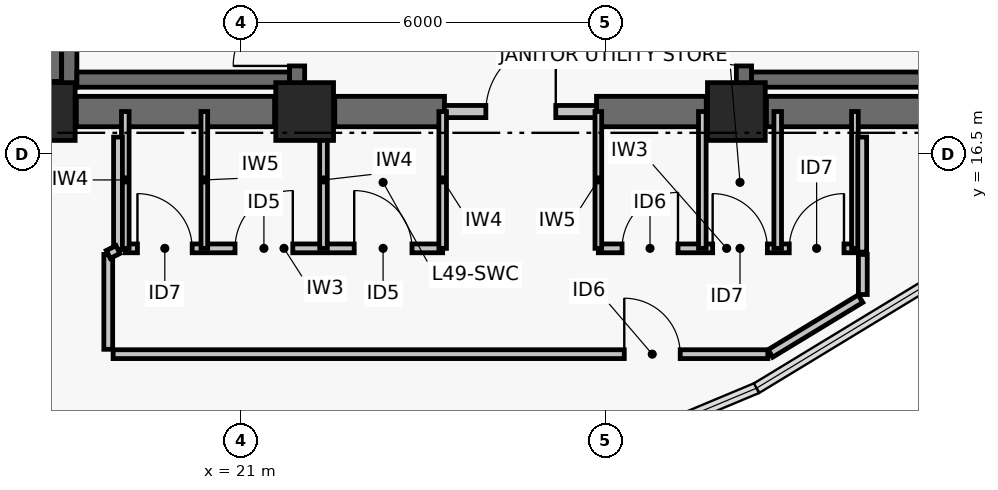
"""IFC4 building model, lengths in metres.
Left out: names, types, materials, properties, quantities, classifications, styles, units other than length and angle.
Written with IfcOpenShell. Run it as: python <this file> out.ifc"""

import sys

from ifc_helpers import new_model, si_unit, direction, frame, frame_2d, origin, origin_2d, place, context, subcontext, project, spatial, rectangle, extrude, element, fill, save


model = new_model("IFC4")
c1 = context("Model", 3, precision=1e-05, world=origin(), true_north=direction((0.0, 1.0)))
c2 = subcontext(c1, "Body", "Model", "MODEL_VIEW")
j1 = project(units=[si_unit("LENGTHUNIT", "METRE"), si_unit("PLANEANGLEUNIT", "RADIAN")], contexts=[c1])
p1 = place(None, origin())
s1 = spatial("IfcSite", under=j1, at=p1, CompositionType="ELEMENT")
p2 = place(p1, origin())
s2 = spatial("IfcBuilding", under=s1, at=p2, CompositionType="ELEMENT")
p3 = place(p2, frame((0.0, 0.0, 195.24)))
s3 = spatial("IfcBuildingStorey", under=s2, at=p3, CompositionType="ELEMENT", Elevation=195.24)
for number, where, z_axis, x_axis in (
    (1, (17.8, 17.2, 0.0), (0.0, 0.0, 1.0), (1.0, 0.0, 0.0)),
    (2, (22.05, 17.2, 0.0), (0.0, 0.0, 1.0), (1.0, 0.0, 0.0)),
    (3, (29.15, 17.2, 0.0), (0.0, 0.0, 1.0), (1.0, 0.0, 0.0)),
):
    element("IfcColumn", number, at=place(p3, frame(where, z_axis=z_axis, x_axis=x_axis)), inside=s3, PredefinedType="COLUMN", context=c2, shape_type="SweptSolid", body=[
        extrude(rectangle(XDim=0.95, YDim=0.95, at=origin_2d()), origin(), (0.0, 0.0, 1.0), 3.72),
    ])
p4 = place(p3, frame((18.295, 17.2, 0.0), z_axis=(0.0, 0.0, 1.0), x_axis=(1.0, 0.0, 0.0)))
e4 = element("IfcWall", 4, at=p4, inside=s3, PredefinedType="SHEAR", context=c2, shape_type="SweptSolid", body=[
    extrude(rectangle(XDim=3.26, YDim=0.5, at=frame_2d((1.63, 0.0))), origin(), (0.0, 0.0, 1.0), 3.5),
])
p5 = place(p3, frame((22.545, 17.2, 0.0), z_axis=(0.0, 0.0, 1.0), x_axis=(1.0, 0.0, 0.0)))
e5 = element("IfcWall", 5, at=p5, inside=s3, PredefinedType="SHEAR", context=c2, shape_type="SweptSolid", body=[
    extrude(rectangle(XDim=1.805, YDim=0.5, at=frame_2d((0.903, 0.0))), origin(), (0.0, 0.0, 1.0), 3.5),
])
p6 = place(p3, frame((26.85, 17.2, 0.0), z_axis=(0.0, 0.0, 1.0), x_axis=(1.0, 0.0, 0.0)))
e6 = element("IfcWall", 6, at=p6, inside=s3, PredefinedType="SHEAR", context=c2, shape_type="SweptSolid", body=[
    extrude(rectangle(XDim=1.805, YDim=0.5, at=frame_2d((0.902, 0.0))), origin(), (0.0, 0.0, 1.0), 3.5),
])
p7 = place(p3, frame((29.645, 17.2, 0.0), z_axis=(0.0, 0.0, 1.0), x_axis=(1.0, 0.0, 0.0)))
e7 = element("IfcWall", 7, at=p7, inside=s3, PredefinedType="SHEAR", context=c2, shape_type="SweptSolid", body=[
    extrude(rectangle(XDim=3.26, YDim=0.5, at=frame_2d((1.63, 0.0))), origin(), (0.0, 0.0, 1.0), 3.5),
])
p8 = place(p3, frame((17.8, 17.695, 0.0), z_axis=(0.0, 0.0, 1.0), x_axis=(0.0, 1.0, 0.0)))
e8 = element("IfcWall", 8, at=p8, inside=s3, PredefinedType="SHEAR", context=c2, shape_type="SweptSolid", body=[
    extrude(rectangle(XDim=8.61, YDim=0.5, at=frame_2d((4.305, 0.0))), origin(), (0.0, 0.0, 1.0), 3.5),
])
p9 = place(p3, frame((18.179, 17.6, 0.0), z_axis=(0.0, 0.0, 1.0), x_axis=(0.0, 1.0, 0.0)))
e9 = element("IfcWall", 9, at=p9, inside=s3, PredefinedType="SHEAR", context=c2, shape_type="SweptSolid", body=[
    extrude(rectangle(XDim=8.8, YDim=0.25, at=frame_2d((4.4, 0.0))), origin(), (0.0, 0.0, 1.0), 3.5),
])
p10 = place(p3, frame((21.925, 17.6, 0.0), z_axis=(0.0, 0.0, 1.0), x_axis=(0.0, 1.0, 0.0)))
e10 = element("IfcWall", 10, at=p10, inside=s3, PredefinedType="SHEAR", context=c2, shape_type="SweptSolid", body=[
    extrude(rectangle(XDim=8.8, YDim=0.25, at=frame_2d((4.4, 0.0))), origin(), (0.0, 0.0, 1.0), 3.5),
])
p11 = place(p10, frame((0.35, 0.0, 0.0)))
e11 = element("IfcOpeningElement", 11, at=p11, cuts=e10, PredefinedType="OPENING", context=c2, shape_type="SweptSolid", body=[
    extrude(rectangle(XDim=1.05, YDim=2.08, at=frame_2d((0.525, 1.04))), frame((0.0, 0.135, 0.0), z_axis=(0.0, -1.0, 0.0), x_axis=(1.0, 0.0, 0.0)), (0.0, 0.0, 1.0), 0.27),
])
p12 = place(p3, frame((18.304, 17.725, 0.0), z_axis=(0.0, 0.0, 1.0), x_axis=(1.0, 0.0, 0.0)))
e12 = element("IfcWall", 12, at=p12, inside=s3, PredefinedType="SHEAR", context=c2, shape_type="SweptSolid", body=[
    extrude(rectangle(XDim=3.496, YDim=0.25, at=frame_2d((1.748, 0.0))), origin(), (0.0, 0.0, 1.0), 3.5),
])
p13 = place(p3, frame((29.275, 17.6, 0.0), z_axis=(0.0, 0.0, 1.0), x_axis=(0.0, 1.0, 0.0)))
e13 = element("IfcWall", 13, at=p13, inside=s3, PredefinedType="SHEAR", context=c2, shape_type="SweptSolid", body=[
    extrude(rectangle(XDim=8.8, YDim=0.25, at=frame_2d((4.4, 0.0))), origin(), (0.0, 0.0, 1.0), 3.5),
])
p14 = place(p13, frame((0.35, 0.0, 0.0)))
e14 = element("IfcOpeningElement", 14, at=p14, cuts=e13, PredefinedType="OPENING", context=c2, shape_type="SweptSolid", body=[
    extrude(rectangle(XDim=1.05, YDim=2.08, at=frame_2d((0.525, 1.04))), frame((0.0, 0.135, 0.0), z_axis=(0.0, -1.0, 0.0), x_axis=(1.0, 0.0, 0.0)), (0.0, 0.0, 1.0), 0.27),
])
p15 = place(p3, frame((29.4, 17.725, 0.0), z_axis=(0.0, 0.0, 1.0), x_axis=(1.0, 0.0, 0.0)))
e15 = element("IfcWall", 15, at=p15, inside=s3, PredefinedType="SHEAR", context=c2, shape_type="SweptSolid", body=[
    extrude(rectangle(XDim=3.496, YDim=0.25, at=frame_2d((1.748, 0.0))), origin(), (0.0, 0.0, 1.0), 3.5),
])
p16 = place(p3, frame((24.35, 17.2, 0.0), z_axis=(0.0, 0.0, 1.0), x_axis=(1.0, 0.0, 0.0)))
e16 = element("IfcWall", 16, at=p16, inside=s3, PredefinedType="PARTITIONING", context=c2, shape_type="SweptSolid", body=[
    extrude(rectangle(XDim=2.5, YDim=0.2, at=frame_2d((1.25, 0.0))), origin(), (0.0, 0.0, 1.0), 2.63),
])
p17 = place(p16, frame((0.68, 0.0, 0.0)))
e17 = element("IfcOpeningElement", 17, at=p17, cuts=e16, PredefinedType="OPENING", context=c2, shape_type="SweptSolid", body=[
    extrude(rectangle(XDim=1.15, YDim=2.08, at=frame_2d((0.575, 1.04))), frame((0.0, 0.11, 0.0), z_axis=(0.0, -1.0, 0.0), x_axis=(1.0, 0.0, 0.0)), (0.0, 0.0, 1.0), 0.22),
])
p18 = place(p3, frame((19.1, 14.95, 0.0), z_axis=(0.0, 0.0, 1.0), x_axis=(1.0, 0.0, 0.0)))
e18 = element("IfcWall", 18, at=p18, inside=s3, PredefinedType="PARTITIONING", context=c2, shape_type="SweptSolid", body=[
    extrude(rectangle(XDim=5.22, YDim=0.145, at=frame_2d((2.61, 0.0))), origin(), (0.0, 0.0, 1.0), 2.73),
])
p19 = place(p18, frame((0.2, 0.0, 0.0)))
e19 = element("IfcOpeningElement", 19, at=p19, cuts=e18, PredefinedType="OPENING", context=c2, shape_type="SweptSolid", body=[
    extrude(rectangle(XDim=0.9, YDim=2.02, at=frame_2d((0.45, 1.01))), frame((0.0, 0.083, 0.0), z_axis=(0.0, -1.0, 0.0), x_axis=(1.0, 0.0, 0.0)), (0.0, 0.0, 1.0), 0.165),
])
p20 = place(p18, frame((1.805, 0.0, 0.0)))
e20 = element("IfcOpeningElement", 20, at=p20, cuts=e18, PredefinedType="OPENING", context=c2, shape_type="SweptSolid", body=[
    extrude(rectangle(XDim=0.95, YDim=2.06, at=frame_2d((0.475, 1.03))), frame((0.0, 0.083, 0.0), z_axis=(0.0, -1.0, 0.0), x_axis=(1.0, 0.0, 0.0)), (0.0, 0.0, 1.0), 0.165),
])
p21 = place(p18, frame((3.765, 0.0, 0.0)))
e21 = element("IfcOpeningElement", 21, at=p21, cuts=e18, PredefinedType="OPENING", context=c2, shape_type="SweptSolid", body=[
    extrude(rectangle(XDim=0.95, YDim=2.06, at=frame_2d((0.475, 1.03))), frame((0.0, 0.083, 0.0), z_axis=(0.0, -1.0, 0.0), x_axis=(1.0, 0.0, 0.0)), (0.0, 0.0, 1.0), 0.165),
])
p22 = place(p3, frame((26.88, 14.95, 0.0), z_axis=(0.0, 0.0, 1.0), x_axis=(1.0, 0.0, 0.0)))
e22 = element("IfcWall", 22, at=p22, inside=s3, PredefinedType="PARTITIONING", context=c2, shape_type="SweptSolid", body=[
    extrude(rectangle(XDim=4.22, YDim=0.145, at=frame_2d((2.11, 0.0))), origin(), (0.0, 0.0, 1.0), 2.93),
])
p23 = place(p22, frame((0.39, 0.0, 0.0)))
e23 = element("IfcOpeningElement", 23, at=p23, cuts=e22, PredefinedType="OPENING", context=c2, shape_type="SweptSolid", body=[
    extrude(rectangle(XDim=0.92, YDim=2.05, at=frame_2d((0.46, 1.025))), frame((0.0, 0.083, 0.0), z_axis=(0.0, -1.0, 0.0), x_axis=(1.0, 0.0, 0.0)), (0.0, 0.0, 1.0), 0.165),
])
p24 = place(p22, frame((1.88, 0.0, 0.0)))
e24 = element("IfcOpeningElement", 24, at=p24, cuts=e22, PredefinedType="OPENING", context=c2, shape_type="SweptSolid", body=[
    extrude(rectangle(XDim=0.9, YDim=2.02, at=frame_2d((0.45, 1.01))), frame((0.0, 0.083, 0.0), z_axis=(0.0, -1.0, 0.0), x_axis=(1.0, 0.0, 0.0)), (0.0, 0.0, 1.0), 0.165),
])
p25 = place(p22, frame((3.14, 0.0, 0.0)))
e25 = element("IfcOpeningElement", 25, at=p25, cuts=e22, PredefinedType="OPENING", context=c2, shape_type="SweptSolid", body=[
    extrude(rectangle(XDim=0.9, YDim=2.02, at=frame_2d((0.45, 1.01))), frame((0.0, 0.083, 0.0), z_axis=(0.0, -1.0, 0.0), x_axis=(1.0, 0.0, 0.0)), (0.0, 0.0, 1.0), 0.165),
])
p26 = place(p3, frame((19.1, 14.95, 0.0), z_axis=(0.0, 0.0, 1.0), x_axis=(0.0, 1.0, 0.0)))
e26 = element("IfcWall", 26, at=p26, inside=s3, PredefinedType="PARTITIONING", context=c2, shape_type="SweptSolid", body=[
    extrude(rectangle(XDim=2.25, YDim=0.125, at=frame_2d((1.125, 0.0))), origin(), (0.0, 0.0, 1.0), 2.63),
])
p27 = place(p3, frame((20.4, 14.95, 0.0), z_axis=(0.0, 0.0, 1.0), x_axis=(0.0, 1.0, 0.0)))
e27 = element("IfcWall", 27, at=p27, inside=s3, PredefinedType="PARTITIONING", context=c2, shape_type="SweptSolid", body=[
    extrude(rectangle(XDim=2.25, YDim=0.11, at=frame_2d((1.125, 0.0))), origin(), (0.0, 0.0, 1.0), 2.63),
])
for number, where, z_axis, x_axis in (
    (28, (22.36, 14.95, 0.0), (0.0, 0.0, 1.0), (0.0, 1.0, 0.0)),
    (29, (24.32, 14.95, 0.0), (0.0, 0.0, 1.0), (0.0, 1.0, 0.0)),
):
    element("IfcWall", number, at=place(p3, frame(where, z_axis=z_axis, x_axis=x_axis)), inside=s3, PredefinedType="PARTITIONING", context=c2, shape_type="SweptSolid", body=[
        extrude(rectangle(XDim=2.25, YDim=0.125, at=frame_2d((1.125, 0.0))), origin(), (0.0, 0.0, 1.0), 2.63),
    ])
p28 = place(p3, frame((26.88, 14.95, 0.0), z_axis=(0.0, 0.0, 1.0), x_axis=(0.0, 1.0, 0.0)))
e30 = element("IfcWall", 30, at=p28, inside=s3, PredefinedType="PARTITIONING", context=c2, shape_type="SweptSolid", body=[
    extrude(rectangle(XDim=2.25, YDim=0.11, at=frame_2d((1.125, 0.0))), origin(), (0.0, 0.0, 1.0), 2.63),
])
for number, where, z_axis, x_axis in (
    (31, (28.59, 14.95, 0.0), (0.0, 0.0, 1.0), (0.0, 1.0, 0.0)),
    (32, (29.83, 14.95, 0.0), (0.0, 0.0, 1.0), (0.0, 1.0, 0.0)),
):
    element("IfcWall", number, at=place(p3, frame(where, z_axis=z_axis, x_axis=x_axis)), inside=s3, PredefinedType="PARTITIONING", context=c2, shape_type="SweptSolid", body=[
        extrude(rectangle(XDim=2.25, YDim=0.125, at=frame_2d((1.125, 0.0))), origin(), (0.0, 0.0, 1.0), 2.63),
    ])
p29 = place(p3, frame((31.1, 14.95, 0.0), z_axis=(0.0, 0.0, 1.0), x_axis=(0.0, 1.0, 0.0)))
e33 = element("IfcWall", 33, at=p29, inside=s3, PredefinedType="PARTITIONING", context=c2, shape_type="SweptSolid", body=[
    extrude(rectangle(XDim=2.25, YDim=0.11, at=frame_2d((1.125, 0.0))), origin(), (0.0, 0.0, 1.0), 2.63),
])
p30 = place(p3, frame((18.98, 16.78, 0.0), z_axis=(0.0, 0.0, 1.0), x_axis=(0.0, -1.0, 0.0)))
e34 = element("IfcWall", 34, at=p30, inside=s3, PredefinedType="PARTITIONING", context=c2, shape_type="SweptSolid", body=[
    extrude(rectangle(XDim=1.85, YDim=0.145, at=frame_2d((0.925, 0.0))), origin(), (0.0, 0.0, 1.0), 2.63),
])
p31 = place(p3, frame((18.82, 14.85, 0.0), z_axis=(0.0, 0.0, 1.0), x_axis=(0.0, -1.0, 0.0)))
e35 = element("IfcWall", 35, at=p31, inside=s3, PredefinedType="PARTITIONING", context=c2, shape_type="SweptSolid", body=[
    extrude(rectangle(XDim=1.56, YDim=0.145, at=frame_2d((0.78, 0.0))), origin(), (0.0, 0.0, 1.0), 3.08),
])
p32 = place(p3, frame((18.9, 13.21, 0.0), z_axis=(0.0, 0.0, 1.0), x_axis=(1.0, 0.0, 0.0)))
e36 = element("IfcWall", 36, at=p32, inside=s3, PredefinedType="PARTITIONING", context=c2, shape_type="SweptSolid", body=[
    extrude(rectangle(XDim=10.768, YDim=0.145, at=frame_2d((5.384, 0.0))), origin(), (0.0, 0.0, 1.0), 2.73),
])
p33 = place(p32, frame((8.406, 0.0, 0.0)))
e37 = element("IfcOpeningElement", 37, at=p33, cuts=e36, PredefinedType="OPENING", context=c2, shape_type="SweptSolid", body=[
    extrude(rectangle(XDim=0.92, YDim=2.05, at=frame_2d((0.46, 1.025))), frame((0.0, 0.083, 0.0), z_axis=(0.0, -1.0, 0.0), x_axis=(1.0, 0.0, 0.0)), (0.0, 0.0, 1.0), 0.165),
])
p34 = place(p3, frame((29.709, 13.222, 0.0), z_axis=(0.0, 0.0, 1.0), x_axis=(0.854635840942, 0.519227868451, 0.0)))
e38 = element("IfcWall", 38, at=p34, inside=s3, PredefinedType="PARTITIONING", context=c2, shape_type="SweptSolid", body=[
    extrude(rectangle(XDim=1.735, YDim=0.145, at=frame_2d((0.867, 0.0))), origin(), (0.0, 0.0, 1.0), 3.5),
])
p35 = place(p3, frame((31.23, 14.191, 0.0), z_axis=(0.0, 0.0, 1.0), x_axis=(0.0, 1.0, 0.0)))
e39 = element("IfcWall", 39, at=p35, inside=s3, PredefinedType="PARTITIONING", context=c2, shape_type="SweptSolid", body=[
    extrude(rectangle(XDim=0.659, YDim=0.145, at=frame_2d((0.33, 0.0))), origin(), (0.0, 0.0, 1.0), 3.5),
])
p36 = place(p3, frame((31.22, 14.889, 0.0), z_axis=(0.0, 0.0, 1.0), x_axis=(0.0, 1.0, 0.0)))
e40 = element("IfcWall", 40, at=p36, inside=s3, PredefinedType="PARTITIONING", context=c2, shape_type="SweptSolid", body=[
    extrude(rectangle(XDim=1.891, YDim=0.145, at=frame_2d((0.946, 0.0))), origin(), (0.0, 0.0, 1.0), 2.63),
])
p37 = place(p3, frame((18.82, 14.85, 0.0), z_axis=(0.0, 0.0, 1.0), x_axis=(0.89470021502, 0.446667130247, 0.0)))
e41 = element("IfcWall", 41, at=p37, inside=s3, PredefinedType="PARTITIONING", context=c2, shape_type="SweptSolid", body=[
    extrude(rectangle(XDim=0.179, YDim=0.145, at=frame_2d((0.089, 0.0))), origin(), (0.0, 0.0, 1.0), 3.5),
])
p38 = place(p11, origin())
e42 = element("IfcDoor", 42, at=p38, inside=s3, OperationType="SINGLE_SWING_LEFT", PredefinedType="DOOR", context=c2, shape_type="SweptSolid", body=[
    extrude(rectangle(XDim=1.05, YDim=2.08, at=frame_2d((0.525, 1.04))), frame((0.0, 0.025, 0.0), z_axis=(0.0, -1.0, 0.0), x_axis=(1.0, 0.0, 0.0)), (0.0, 0.0, 1.0), 0.05),
])
fill(e11, e42)
p39 = place(p14, origin())
e43 = element("IfcDoor", 43, at=p39, inside=s3, OperationType="SINGLE_SWING_RIGHT", PredefinedType="DOOR", context=c2, shape_type="SweptSolid", body=[
    extrude(rectangle(XDim=1.05, YDim=2.08, at=frame_2d((0.525, 1.04))), frame((0.0, 0.025, 0.0), z_axis=(0.0, -1.0, 0.0), x_axis=(1.0, 0.0, 0.0)), (0.0, 0.0, 1.0), 0.05),
])
fill(e14, e43)
p40 = place(p17, origin())
e44 = element("IfcDoor", 44, at=p40, inside=s3, OperationType="SINGLE_SWING_RIGHT", PredefinedType="DOOR", context=c2, shape_type="SweptSolid", body=[
    extrude(rectangle(XDim=1.15, YDim=2.08, at=frame_2d((0.575, 1.04))), frame((0.0, 0.025, 0.0), z_axis=(0.0, -1.0, 0.0), x_axis=(1.0, 0.0, 0.0)), (0.0, 0.0, 1.0), 0.05),
])
fill(e17, e44)
p41 = place(p19, origin())
e45 = element("IfcDoor", 45, at=p41, inside=s3, OperationType="SINGLE_SWING_LEFT", PredefinedType="DOOR", context=c2, shape_type="SweptSolid", body=[
    extrude(rectangle(XDim=0.9, YDim=2.02, at=frame_2d((0.45, 1.01))), frame((0.0, 0.025, 0.0), z_axis=(0.0, -1.0, 0.0), x_axis=(1.0, 0.0, 0.0)), (0.0, 0.0, 1.0), 0.05),
])
fill(e19, e45)
p42 = place(p20, origin())
e46 = element("IfcDoor", 46, at=p42, inside=s3, OperationType="SINGLE_SWING_RIGHT", PredefinedType="DOOR", context=c2, shape_type="SweptSolid", body=[
    extrude(rectangle(XDim=0.95, YDim=2.06, at=frame_2d((0.475, 1.03))), frame((0.0, 0.025, 0.0), z_axis=(0.0, -1.0, 0.0), x_axis=(1.0, 0.0, 0.0)), (0.0, 0.0, 1.0), 0.05),
])
fill(e20, e46)
p43 = place(p21, origin())
e47 = element("IfcDoor", 47, at=p43, inside=s3, OperationType="SINGLE_SWING_LEFT", PredefinedType="DOOR", context=c2, shape_type="SweptSolid", body=[
    extrude(rectangle(XDim=0.95, YDim=2.06, at=frame_2d((0.475, 1.03))), frame((0.0, 0.025, 0.0), z_axis=(0.0, -1.0, 0.0), x_axis=(1.0, 0.0, 0.0)), (0.0, 0.0, 1.0), 0.05),
])
fill(e21, e47)
p44 = place(p23, origin())
e48 = element("IfcDoor", 48, at=p44, inside=s3, OperationType="SINGLE_SWING_RIGHT", PredefinedType="DOOR", context=c2, shape_type="SweptSolid", body=[
    extrude(rectangle(XDim=0.92, YDim=2.05, at=frame_2d((0.46, 1.025))), frame((0.0, 0.025, 0.0), z_axis=(0.0, -1.0, 0.0), x_axis=(1.0, 0.0, 0.0)), (0.0, 0.0, 1.0), 0.05),
])
fill(e23, e48)
p45 = place(p24, origin())
e49 = element("IfcDoor", 49, at=p45, inside=s3, OperationType="SINGLE_SWING_LEFT", PredefinedType="DOOR", context=c2, shape_type="SweptSolid", body=[
    extrude(rectangle(XDim=0.9, YDim=2.02, at=frame_2d((0.45, 1.01))), frame((0.0, 0.025, 0.0), z_axis=(0.0, -1.0, 0.0), x_axis=(1.0, 0.0, 0.0)), (0.0, 0.0, 1.0), 0.05),
])
fill(e24, e49)
p46 = place(p25, origin())
e50 = element("IfcDoor", 50, at=p46, inside=s3, OperationType="SINGLE_SWING_RIGHT", PredefinedType="DOOR", context=c2, shape_type="SweptSolid", body=[
    extrude(rectangle(XDim=0.9, YDim=2.02, at=frame_2d((0.45, 1.01))), frame((0.0, 0.025, 0.0), z_axis=(0.0, -1.0, 0.0), x_axis=(1.0, 0.0, 0.0)), (0.0, 0.0, 1.0), 0.05),
])
fill(e25, e50)
p47 = place(p33, origin())
e51 = element("IfcDoor", 51, at=p47, inside=s3, OperationType="SINGLE_SWING_LEFT", PredefinedType="DOOR", context=c2, shape_type="SweptSolid", body=[
    extrude(rectangle(XDim=0.92, YDim=2.05, at=frame_2d((0.46, 1.025))), frame((0.0, 0.025, 0.0), z_axis=(0.0, -1.0, 0.0), x_axis=(1.0, 0.0, 0.0)), (0.0, 0.0, 1.0), 0.05),
])
fill(e37, e51)
save(model, sys.argv[1])
